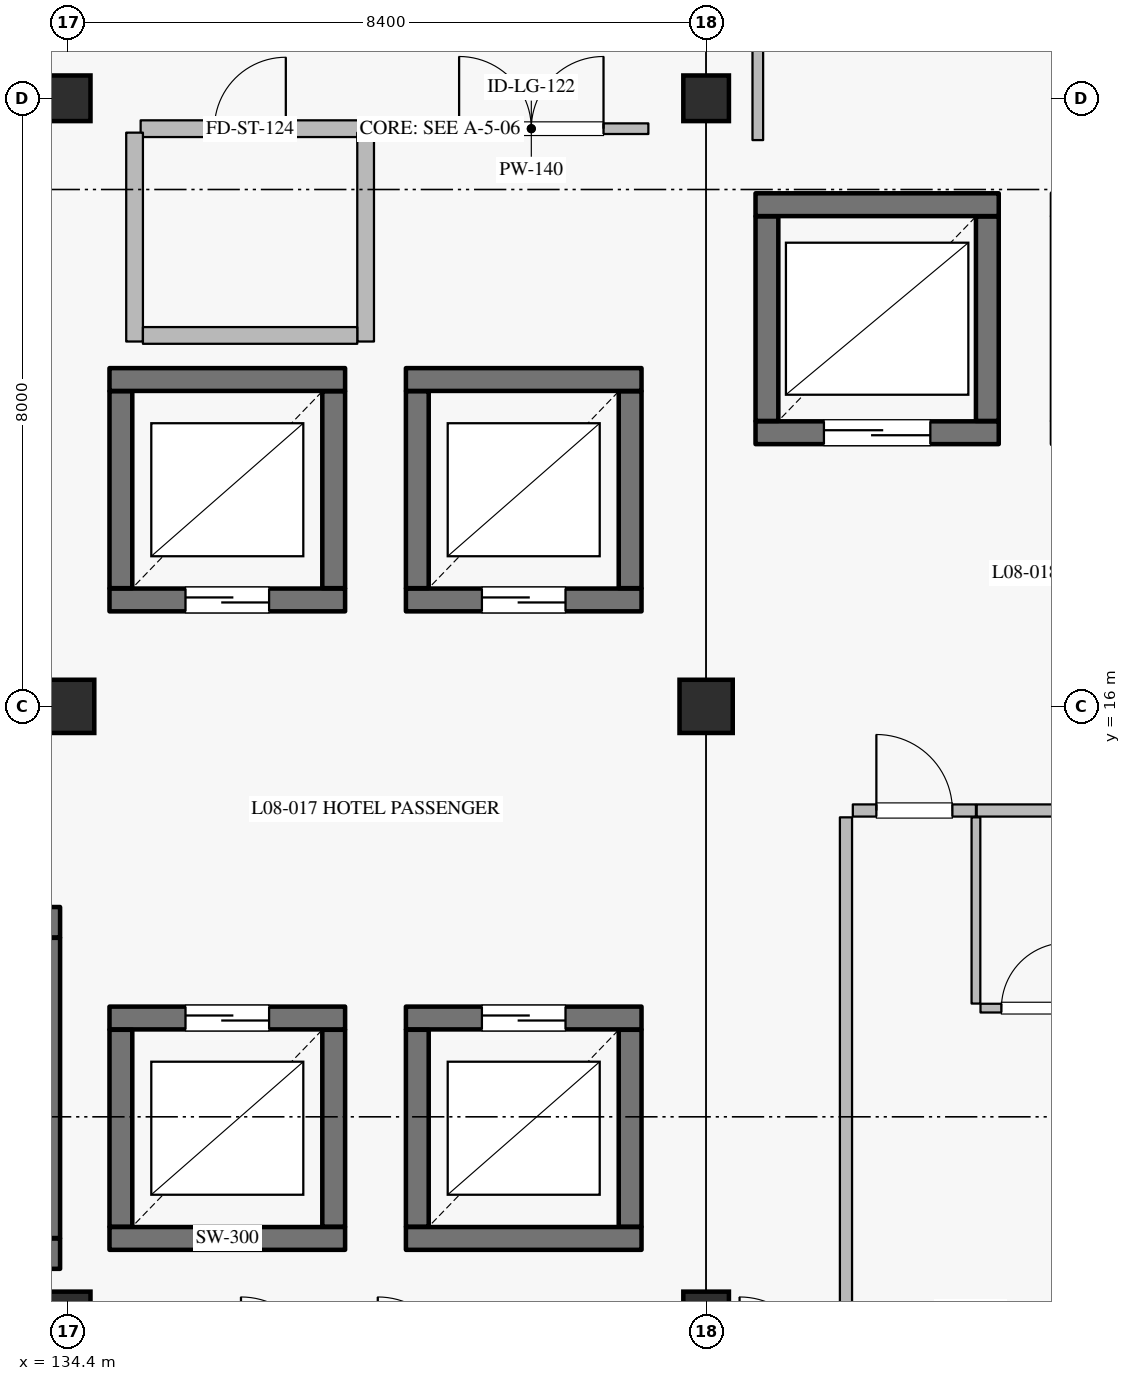
"""IFC4 building model, lengths in metres.
Left out: names, types, materials, properties, quantities, classifications, styles, units other than length and angle.
Written with IfcOpenShell. Run it as: python <this file> out.ifc"""

import sys

from ifc_helpers import new_model, si_unit, direction, frame, frame_2d, origin, origin_2d, place, context, subcontext, project, spatial, rectangle, extrude, element, fill, save


model = new_model("IFC4")
c1 = context("Model", 3, precision=1e-05, world=origin(), true_north=direction((0.0, 1.0)))
c2 = subcontext(c1, "Body", "Model", "MODEL_VIEW")
j1 = project(units=[si_unit("LENGTHUNIT", "METRE"), si_unit("PLANEANGLEUNIT", "RADIAN")], contexts=[c1])
p1 = place(None, origin())
s1 = spatial("IfcSite", under=j1, at=p1, CompositionType="ELEMENT")
p2 = place(p1, origin())
s2 = spatial("IfcBuilding", under=s1, at=p2, CompositionType="ELEMENT")
p3 = place(p2, frame((0.0, 0.0, 36.0)))
s3 = spatial("IfcBuildingStorey", under=s2, at=p3, CompositionType="ELEMENT", Elevation=36.0)
for number, where, z_axis, x_axis in (
    (1, (134.4, 16.0, 0.0), (0.0, 0.0, 1.0), (1.0, 0.0, 0.0)),
    (2, (142.8, 16.0, 0.0), (0.0, 0.0, 1.0), (1.0, 0.0, 0.0)),
):
    element("IfcColumn", number, at=place(p3, frame(where, z_axis=z_axis, x_axis=x_axis)), inside=s3, PredefinedType="COLUMN", context=c2, shape_type="SweptSolid", body=[
        extrude(rectangle(XDim=0.7, YDim=0.7, at=origin_2d()), origin(), (0.0, 0.0, 1.0), 3.6),
    ])
for number, where, z_axis, x_axis in (
    (3, (134.4, 8.0, 0.0), (0.0, 0.0, 1.0), (1.0, 0.0, 0.0)),
    (4, (134.4, 24.0, 0.0), (0.0, 0.0, 1.0), (1.0, 0.0, 0.0)),
    (5, (142.8, 8.0, 0.0), (0.0, 0.0, 1.0), (1.0, 0.0, 0.0)),
    (6, (142.8, 24.0, 0.0), (0.0, 0.0, 1.0), (1.0, 0.0, 0.0)),
):
    element("IfcColumn", number, at=place(p3, frame(where, z_axis=z_axis, x_axis=x_axis)), inside=s3, PredefinedType="COLUMN", context=c2, shape_type="SweptSolid", body=[
        extrude(rectangle(XDim=0.6, YDim=0.6, at=origin_2d()), origin(), (0.0, 0.0, 1.0), 3.6),
    ])
p4 = place(p3, frame((134.95, 17.4, 0.0), z_axis=(0.0, 0.0, 1.0), x_axis=(1.0, 0.0, 0.0)))
e7 = element("IfcWall", 7, at=p4, inside=s3, PredefinedType="SHEAR", context=c2, shape_type="SweptSolid", body=[
    extrude(rectangle(XDim=3.1, YDim=0.3, at=frame_2d((1.55, 0.0))), origin(), (0.0, 0.0, 1.0), 3.365),
])
p5 = place(p4, frame((1.0, 0.0, 0.0)))
e8 = element("IfcOpeningElement", 8, at=p5, cuts=e7, PredefinedType="OPENING", context=c2, shape_type="SweptSolid", body=[
    extrude(rectangle(XDim=1.1, YDim=2.2, at=frame_2d((0.55, 1.1))), frame((0.0, 0.16, 0.0), z_axis=(0.0, -1.0, 0.0), x_axis=(1.0, 0.0, 0.0)), (0.0, 0.0, 1.0), 0.32),
])
p6 = place(p3, frame((137.9, 17.555, 0.0), z_axis=(0.0, 0.0, 1.0), x_axis=(0.0, 1.0, 0.0)))
e9 = element("IfcWall", 9, at=p6, inside=s3, PredefinedType="SHEAR", context=c2, shape_type="SweptSolid", body=[
    extrude(rectangle(XDim=2.59, YDim=0.3, at=frame_2d((1.295, 0.0))), origin(), (0.0, 0.0, 1.0), 3.365),
])
p7 = place(p3, frame((138.05, 20.3, 0.0), z_axis=(0.0, 0.0, 1.0), x_axis=(-1.0, 0.0, 0.0)))
e10 = element("IfcWall", 10, at=p7, inside=s3, PredefinedType="SHEAR", context=c2, shape_type="SweptSolid", body=[
    extrude(rectangle(XDim=3.1, YDim=0.3, at=frame_2d((1.55, 0.0))), origin(), (0.0, 0.0, 1.0), 3.365),
])
p8 = place(p3, frame((135.1, 20.145, 0.0), z_axis=(0.0, 0.0, 1.0), x_axis=(0.0, -1.0, 0.0)))
e11 = element("IfcWall", 11, at=p8, inside=s3, PredefinedType="SHEAR", context=c2, shape_type="SweptSolid", body=[
    extrude(rectangle(XDim=2.59, YDim=0.3, at=frame_2d((1.295, 0.0))), origin(), (0.0, 0.0, 1.0), 3.365),
])
p9 = place(p3, frame((138.85, 17.4, 0.0), z_axis=(0.0, 0.0, 1.0), x_axis=(1.0, 0.0, 0.0)))
e12 = element("IfcWall", 12, at=p9, inside=s3, PredefinedType="SHEAR", context=c2, shape_type="SweptSolid", body=[
    extrude(rectangle(XDim=3.1, YDim=0.3, at=frame_2d((1.55, 0.0))), origin(), (0.0, 0.0, 1.0), 3.365),
])
p10 = place(p9, frame((1.0, 0.0, 0.0)))
e13 = element("IfcOpeningElement", 13, at=p10, cuts=e12, PredefinedType="OPENING", context=c2, shape_type="SweptSolid", body=[
    extrude(rectangle(XDim=1.1, YDim=2.2, at=frame_2d((0.55, 1.1))), frame((0.0, 0.16, 0.0), z_axis=(0.0, -1.0, 0.0), x_axis=(1.0, 0.0, 0.0)), (0.0, 0.0, 1.0), 0.32),
])
p11 = place(p3, frame((141.8, 17.555, 0.0), z_axis=(0.0, 0.0, 1.0), x_axis=(0.0, 1.0, 0.0)))
e14 = element("IfcWall", 14, at=p11, inside=s3, PredefinedType="SHEAR", context=c2, shape_type="SweptSolid", body=[
    extrude(rectangle(XDim=2.59, YDim=0.3, at=frame_2d((1.295, 0.0))), origin(), (0.0, 0.0, 1.0), 3.365),
])
p12 = place(p3, frame((141.95, 20.3, 0.0), z_axis=(0.0, 0.0, 1.0), x_axis=(-1.0, 0.0, 0.0)))
e15 = element("IfcWall", 15, at=p12, inside=s3, PredefinedType="SHEAR", context=c2, shape_type="SweptSolid", body=[
    extrude(rectangle(XDim=3.1, YDim=0.3, at=frame_2d((1.55, 0.0))), origin(), (0.0, 0.0, 1.0), 3.365),
])
p13 = place(p3, frame((139.0, 20.145, 0.0), z_axis=(0.0, 0.0, 1.0), x_axis=(0.0, -1.0, 0.0)))
e16 = element("IfcWall", 16, at=p13, inside=s3, PredefinedType="SHEAR", context=c2, shape_type="SweptSolid", body=[
    extrude(rectangle(XDim=2.59, YDim=0.3, at=frame_2d((1.295, 0.0))), origin(), (0.0, 0.0, 1.0), 3.365),
])
p14 = place(p3, frame((134.95, 9.0, 0.0), z_axis=(0.0, 0.0, 1.0), x_axis=(1.0, 0.0, 0.0)))
e17 = element("IfcWall", 17, at=p14, inside=s3, PredefinedType="SHEAR", context=c2, shape_type="SweptSolid", body=[
    extrude(rectangle(XDim=3.1, YDim=0.3, at=frame_2d((1.55, 0.0))), origin(), (0.0, 0.0, 1.0), 3.365),
])
p15 = place(p3, frame((137.9, 9.155, 0.0), z_axis=(0.0, 0.0, 1.0), x_axis=(0.0, 1.0, 0.0)))
e18 = element("IfcWall", 18, at=p15, inside=s3, PredefinedType="SHEAR", context=c2, shape_type="SweptSolid", body=[
    extrude(rectangle(XDim=2.59, YDim=0.3, at=frame_2d((1.295, 0.0))), origin(), (0.0, 0.0, 1.0), 3.365),
])
p16 = place(p3, frame((138.05, 11.9, 0.0), z_axis=(0.0, 0.0, 1.0), x_axis=(-1.0, 0.0, 0.0)))
e19 = element("IfcWall", 19, at=p16, inside=s3, PredefinedType="SHEAR", context=c2, shape_type="SweptSolid", body=[
    extrude(rectangle(XDim=3.1, YDim=0.3, at=frame_2d((1.55, 0.0))), origin(), (0.0, 0.0, 1.0), 3.365),
])
p17 = place(p16, frame((1.0, 0.0, 0.0)))
e20 = element("IfcOpeningElement", 20, at=p17, cuts=e19, PredefinedType="OPENING", context=c2, shape_type="SweptSolid", body=[
    extrude(rectangle(XDim=1.1, YDim=2.2, at=frame_2d((0.55, 1.1))), frame((0.0, 0.16, 0.0), z_axis=(0.0, -1.0, 0.0), x_axis=(1.0, 0.0, 0.0)), (0.0, 0.0, 1.0), 0.32),
])
p18 = place(p3, frame((135.1, 11.745, 0.0), z_axis=(0.0, 0.0, 1.0), x_axis=(0.0, -1.0, 0.0)))
e21 = element("IfcWall", 21, at=p18, inside=s3, PredefinedType="SHEAR", context=c2, shape_type="SweptSolid", body=[
    extrude(rectangle(XDim=2.59, YDim=0.3, at=frame_2d((1.295, 0.0))), origin(), (0.0, 0.0, 1.0), 3.365),
])
p19 = place(p3, frame((138.85, 9.0, 0.0), z_axis=(0.0, 0.0, 1.0), x_axis=(1.0, 0.0, 0.0)))
e22 = element("IfcWall", 22, at=p19, inside=s3, PredefinedType="SHEAR", context=c2, shape_type="SweptSolid", body=[
    extrude(rectangle(XDim=3.1, YDim=0.3, at=frame_2d((1.55, 0.0))), origin(), (0.0, 0.0, 1.0), 3.365),
])
p20 = place(p3, frame((141.8, 9.155, 0.0), z_axis=(0.0, 0.0, 1.0), x_axis=(0.0, 1.0, 0.0)))
e23 = element("IfcWall", 23, at=p20, inside=s3, PredefinedType="SHEAR", context=c2, shape_type="SweptSolid", body=[
    extrude(rectangle(XDim=2.59, YDim=0.3, at=frame_2d((1.295, 0.0))), origin(), (0.0, 0.0, 1.0), 3.365),
])
p21 = place(p3, frame((141.95, 11.9, 0.0), z_axis=(0.0, 0.0, 1.0), x_axis=(-1.0, 0.0, 0.0)))
e24 = element("IfcWall", 24, at=p21, inside=s3, PredefinedType="SHEAR", context=c2, shape_type="SweptSolid", body=[
    extrude(rectangle(XDim=3.1, YDim=0.3, at=frame_2d((1.55, 0.0))), origin(), (0.0, 0.0, 1.0), 3.365),
])
p22 = place(p21, frame((1.0, 0.0, 0.0)))
e25 = element("IfcOpeningElement", 25, at=p22, cuts=e24, PredefinedType="OPENING", context=c2, shape_type="SweptSolid", body=[
    extrude(rectangle(XDim=1.1, YDim=2.2, at=frame_2d((0.55, 1.1))), frame((0.0, 0.16, 0.0), z_axis=(0.0, -1.0, 0.0), x_axis=(1.0, 0.0, 0.0)), (0.0, 0.0, 1.0), 0.32),
])
p23 = place(p3, frame((139.0, 11.745, 0.0), z_axis=(0.0, 0.0, 1.0), x_axis=(0.0, -1.0, 0.0)))
e26 = element("IfcWall", 26, at=p23, inside=s3, PredefinedType="SHEAR", context=c2, shape_type="SweptSolid", body=[
    extrude(rectangle(XDim=2.59, YDim=0.3, at=frame_2d((1.295, 0.0))), origin(), (0.0, 0.0, 1.0), 3.365),
])
p24 = place(p3, frame((143.45, 19.6, 0.0), z_axis=(0.0, 0.0, 1.0), x_axis=(1.0, 0.0, 0.0)))
e27 = element("IfcWall", 27, at=p24, inside=s3, PredefinedType="SHEAR", context=c2, shape_type="SweptSolid", body=[
    extrude(rectangle(XDim=3.2, YDim=0.3, at=frame_2d((1.6, 0.0))), origin(), (0.0, 0.0, 1.0), 3.365),
])
p25 = place(p24, frame((0.9, 0.0, 0.0)))
e28 = element("IfcOpeningElement", 28, at=p25, cuts=e27, PredefinedType="OPENING", context=c2, shape_type="SweptSolid", body=[
    extrude(rectangle(XDim=1.4, YDim=2.35, at=frame_2d((0.7, 1.175))), frame((0.0, 0.16, 0.0), z_axis=(0.0, -1.0, 0.0), x_axis=(1.0, 0.0, 0.0)), (0.0, 0.0, 1.0), 0.32),
])
p26 = place(p3, frame((146.5, 19.755, 0.0), z_axis=(0.0, 0.0, 1.0), x_axis=(0.0, 1.0, 0.0)))
e29 = element("IfcWall", 29, at=p26, inside=s3, PredefinedType="SHEAR", context=c2, shape_type="SweptSolid", body=[
    extrude(rectangle(XDim=2.69, YDim=0.3, at=frame_2d((1.345, 0.0))), origin(), (0.0, 0.0, 1.0), 3.365),
])
p27 = place(p3, frame((146.65, 22.6, 0.0), z_axis=(0.0, 0.0, 1.0), x_axis=(-1.0, 0.0, 0.0)))
e30 = element("IfcWall", 30, at=p27, inside=s3, PredefinedType="SHEAR", context=c2, shape_type="SweptSolid", body=[
    extrude(rectangle(XDim=3.2, YDim=0.3, at=frame_2d((1.6, 0.0))), origin(), (0.0, 0.0, 1.0), 3.365),
])
p28 = place(p3, frame((143.6, 22.445, 0.0), z_axis=(0.0, 0.0, 1.0), x_axis=(0.0, -1.0, 0.0)))
e31 = element("IfcWall", 31, at=p28, inside=s3, PredefinedType="SHEAR", context=c2, shape_type="SweptSolid", body=[
    extrude(rectangle(XDim=2.69, YDim=0.3, at=frame_2d((1.345, 0.0))), origin(), (0.0, 0.0, 1.0), 3.365),
])
p29 = place(p3, frame((126.1, 8.8, 0.0), z_axis=(0.0, 0.0, 1.0), x_axis=(1.0, 0.0, 0.0)))
e32 = element("IfcWall", 32, at=p29, inside=s3, PredefinedType="SHEAR", context=c2, shape_type="SweptSolid", body=[
    extrude(rectangle(XDim=8.2, YDim=0.4, at=frame_2d((4.1, 0.0))), origin(), (0.0, 0.0, 1.0), 3.365),
])
p30 = place(p3, frame((134.1, 9.005, 0.0), z_axis=(0.0, 0.0, 1.0), x_axis=(0.0, 1.0, 0.0)))
e33 = element("IfcWall", 33, at=p30, inside=s3, PredefinedType="SHEAR", context=c2, shape_type="SweptSolid", body=[
    extrude(rectangle(XDim=3.95, YDim=0.4, at=frame_2d((1.975, 0.0))), origin(), (0.0, 0.0, 1.0), 3.365),
])
p31 = place(p3, frame((126.1, 13.16, 0.0), z_axis=(0.0, 0.0, 1.0), x_axis=(1.0, 0.0, 0.0)))
e34 = element("IfcWall", 34, at=p31, inside=s3, PredefinedType="SHEAR", context=c2, shape_type="SweptSolid", body=[
    extrude(rectangle(XDim=8.2, YDim=0.4, at=frame_2d((4.1, 0.0))), origin(), (0.0, 0.0, 1.0), 3.365),
])
p32 = place(p31, frame((0.43, 0.0, 0.0)))
e35 = element("IfcOpeningElement", 35, at=p32, cuts=e34, PredefinedType="OPENING", context=c2, shape_type="SweptSolid", body=[
    extrude(rectangle(XDim=1.16, YDim=2.2, at=frame_2d((0.58, 1.1))), frame((0.0, 0.21, 0.0), z_axis=(0.0, -1.0, 0.0), x_axis=(1.0, 0.0, 0.0)), (0.0, 0.0, 1.0), 0.42),
])
p33 = place(p3, frame((144.73, 14.63, 0.0), z_axis=(0.0, 0.0, 1.0), x_axis=(1.0, 0.0, 0.0)))
e36 = element("IfcWall", 36, at=p33, inside=s3, PredefinedType="PARTITIONING", context=c2, shape_type="SweptSolid", body=[
    extrude(rectangle(XDim=1.62, YDim=0.16, at=frame_2d((0.81, 0.0))), origin(), (0.0, 0.0, 1.0), 3.365),
])
p34 = place(p33, frame((0.31, 0.0, 0.0)))
e37 = element("IfcOpeningElement", 37, at=p34, cuts=e36, PredefinedType="OPENING", context=c2, shape_type="SweptSolid", body=[
    extrude(rectangle(XDim=1.0, YDim=2.25, at=frame_2d((0.5, 1.125))), frame((0.0, 0.09, 0.0), z_axis=(0.0, -1.0, 0.0), x_axis=(1.0, 0.0, 0.0)), (0.0, 0.0, 1.0), 0.18),
])
p35 = place(p3, frame((146.36, 14.63, 0.0), z_axis=(0.0, 0.0, 1.0), x_axis=(1.0, 0.0, 0.0)))
e38 = element("IfcWall", 38, at=p35, inside=s3, PredefinedType="PARTITIONING", context=c2, shape_type="SweptSolid", body=[
    extrude(rectangle(XDim=1.47, YDim=0.16, at=frame_2d((0.735, 0.0))), origin(), (0.0, 0.0, 1.0), 3.365),
])
p36 = place(p3, frame((146.35, 12.09, 0.0), z_axis=(0.0, 0.0, 1.0), x_axis=(0.0, 1.0, 0.0)))
e39 = element("IfcWall", 39, at=p36, inside=s3, PredefinedType="PARTITIONING", context=c2, shape_type="SweptSolid", body=[
    extrude(rectangle(XDim=2.45, YDim=0.115, at=frame_2d((1.225, 0.0))), origin(), (0.0, 0.0, 1.0), 3.365),
])
p37 = place(p3, frame((146.41, 12.03, 0.0), z_axis=(0.0, 0.0, 1.0), x_axis=(1.0, 0.0, 0.0)))
e40 = element("IfcWall", 40, at=p37, inside=s3, PredefinedType="PARTITIONING", context=c2, shape_type="SweptSolid", body=[
    extrude(rectangle(XDim=1.41, YDim=0.115, at=frame_2d((0.705, 0.0))), origin(), (0.0, 0.0, 1.0), 3.365),
])
p38 = place(p37, frame((0.275, 0.0, 0.0)))
e41 = element("IfcOpeningElement", 41, at=p38, cuts=e40, PredefinedType="OPENING", context=c2, shape_type="SweptSolid", body=[
    extrude(rectangle(XDim=0.86, YDim=2.12, at=frame_2d((0.43, 1.06))), frame((0.0, 0.067, 0.0), z_axis=(0.0, -1.0, 0.0), x_axis=(1.0, 0.0, 0.0)), (0.0, 0.0, 1.0), 0.135),
])
p39 = place(p3, frame((144.64, 5.22, 0.0), z_axis=(0.0, 0.0, 1.0), x_axis=(0.0, 1.0, 0.0)))
e42 = element("IfcWall", 42, at=p39, inside=s3, PredefinedType="PARTITIONING", context=c2, shape_type="SweptSolid", body=[
    extrude(rectangle(XDim=9.32, YDim=0.16, at=frame_2d((4.66, 0.0))), origin(), (0.0, 0.0, 1.0), 3.365),
])
p40 = place(p3, frame((138.96, 23.6, 0.0), z_axis=(0.0, 0.0, 1.0), x_axis=(1.0, 0.0, 0.0)))
e43 = element("IfcWall", 43, at=p40, inside=s3, PredefinedType="PARTITIONING", context=c2, shape_type="SweptSolid", body=[
    extrude(rectangle(XDim=3.08, YDim=0.14, at=frame_2d((1.54, 0.0))), origin(), (0.0, 0.0, 1.0), 3.365),
])
p41 = place(p40, frame((0.59, 0.0, 0.0)))
e44 = element("IfcOpeningElement", 44, at=p41, cuts=e43, PredefinedType="OPENING", context=c2, shape_type="SweptSolid", body=[
    extrude(rectangle(XDim=1.9, YDim=2.4, at=frame_2d((0.95, 1.2))), frame((0.0, 0.08, 0.0), z_axis=(0.0, -1.0, 0.0), x_axis=(1.0, 0.0, 0.0)), (0.0, 0.0, 1.0), 0.16),
])
p42 = place(p3, frame((135.36, 23.6, 0.0), z_axis=(0.0, 0.0, 1.0), x_axis=(1.0, 0.0, 0.0)))
e45 = element("IfcWall", 45, at=p42, inside=s3, PredefinedType="PARTITIONING", context=c2, shape_type="SweptSolid", body=[
    extrude(rectangle(XDim=2.88, YDim=0.22, at=frame_2d((1.44, 0.0))), origin(), (0.0, 0.0, 1.0), 3.365),
])
p43 = place(p42, frame((0.97, 0.0, 0.0)))
e46 = element("IfcOpeningElement", 46, at=p43, cuts=e45, PredefinedType="OPENING", context=c2, shape_type="SweptSolid", body=[
    extrude(rectangle(XDim=0.94, YDim=2.15, at=frame_2d((0.47, 1.075))), frame((0.0, 0.12, 0.0), z_axis=(0.0, -1.0, 0.0), x_axis=(1.0, 0.0, 0.0)), (0.0, 0.0, 1.0), 0.24),
])
p44 = place(p3, frame((143.48, 23.45, 0.0), z_axis=(0.0, 0.0, 1.0), x_axis=(0.0, 1.0, 0.0)))
e47 = element("IfcWall", 47, at=p44, inside=s3, PredefinedType="PARTITIONING", context=c2, shape_type="SweptSolid", body=[
    extrude(rectangle(XDim=3.21, YDim=0.14, at=frame_2d((1.605, 0.0))), origin(), (0.0, 0.0, 1.0), 3.365),
])
for number, where, z_axis, x_axis in (
    (48, (135.28, 20.8, 0.0), (0.0, 0.0, 1.0), (0.0, 1.0, 0.0)),
    (49, (138.32, 20.8, 0.0), (0.0, 0.0, 1.0), (0.0, 1.0, 0.0)),
):
    element("IfcWall", number, at=place(p3, frame(where, z_axis=z_axis, x_axis=x_axis)), inside=s3, PredefinedType="PARTITIONING", context=c2, shape_type="SweptSolid", body=[
        extrude(rectangle(XDim=2.748, YDim=0.22, at=frame_2d((1.374, 0.0))), origin(), (0.0, 0.0, 1.0), 3.365),
    ])
p45 = place(p3, frame((135.39, 20.88, 0.0), z_axis=(0.0, 0.0, 1.0), x_axis=(1.0, 0.0, 0.0)))
e50 = element("IfcWall", 50, at=p45, inside=s3, PredefinedType="PARTITIONING", context=c2, shape_type="SweptSolid", body=[
    extrude(rectangle(XDim=2.82, YDim=0.22, at=frame_2d((1.41, 0.0))), origin(), (0.0, 0.0, 1.0), 3.365),
])
p46 = place(p5, origin())
e51 = element("IfcDoor", 51, at=p46, inside=s3, OperationType="DOUBLE_DOOR_SLIDING", PredefinedType="DOOR", context=c2, shape_type="SweptSolid", body=[
    extrude(rectangle(XDim=1.1, YDim=2.2, at=frame_2d((0.55, 1.1))), frame((0.0, 0.025, 0.0), z_axis=(0.0, -1.0, 0.0), x_axis=(1.0, 0.0, 0.0)), (0.0, 0.0, 1.0), 0.05),
])
fill(e8, e51)
p47 = place(p10, origin())
e52 = element("IfcDoor", 52, at=p47, inside=s3, OperationType="DOUBLE_DOOR_SLIDING", PredefinedType="DOOR", context=c2, shape_type="SweptSolid", body=[
    extrude(rectangle(XDim=1.1, YDim=2.2, at=frame_2d((0.55, 1.1))), frame((0.0, 0.025, 0.0), z_axis=(0.0, -1.0, 0.0), x_axis=(1.0, 0.0, 0.0)), (0.0, 0.0, 1.0), 0.05),
])
fill(e13, e52)
p48 = place(p17, origin())
e53 = element("IfcDoor", 53, at=p48, inside=s3, OperationType="DOUBLE_DOOR_SLIDING", PredefinedType="DOOR", context=c2, shape_type="SweptSolid", body=[
    extrude(rectangle(XDim=1.1, YDim=2.2, at=frame_2d((0.55, 1.1))), frame((0.0, 0.025, 0.0), z_axis=(0.0, -1.0, 0.0), x_axis=(1.0, 0.0, 0.0)), (0.0, 0.0, 1.0), 0.05),
])
fill(e20, e53)
p49 = place(p22, origin())
e54 = element("IfcDoor", 54, at=p49, inside=s3, OperationType="DOUBLE_DOOR_SLIDING", PredefinedType="DOOR", context=c2, shape_type="SweptSolid", body=[
    extrude(rectangle(XDim=1.1, YDim=2.2, at=frame_2d((0.55, 1.1))), frame((0.0, 0.025, 0.0), z_axis=(0.0, -1.0, 0.0), x_axis=(1.0, 0.0, 0.0)), (0.0, 0.0, 1.0), 0.05),
])
fill(e25, e54)
p50 = place(p25, origin())
e55 = element("IfcDoor", 55, at=p50, inside=s3, OperationType="DOUBLE_DOOR_SLIDING", PredefinedType="DOOR", context=c2, shape_type="SweptSolid", body=[
    extrude(rectangle(XDim=1.4, YDim=2.35, at=frame_2d((0.7, 1.175))), frame((0.0, 0.025, 0.0), z_axis=(0.0, -1.0, 0.0), x_axis=(1.0, 0.0, 0.0)), (0.0, 0.0, 1.0), 0.05),
])
fill(e28, e55)
p51 = place(p34, origin())
e56 = element("IfcDoor", 56, at=p51, inside=s3, OperationType="SINGLE_SWING_LEFT", PredefinedType="DOOR", context=c2, shape_type="SweptSolid", body=[
    extrude(rectangle(XDim=1.0, YDim=2.25, at=frame_2d((0.5, 1.125))), frame((0.0, 0.025, 0.0), z_axis=(0.0, -1.0, 0.0), x_axis=(1.0, 0.0, 0.0)), (0.0, 0.0, 1.0), 0.05),
])
fill(e37, e56)
p52 = place(p38, origin())
e57 = element("IfcDoor", 57, at=p52, inside=s3, OperationType="SINGLE_SWING_RIGHT", PredefinedType="DOOR", context=c2, shape_type="SweptSolid", body=[
    extrude(rectangle(XDim=0.86, YDim=2.12, at=frame_2d((0.43, 1.06))), frame((0.0, 0.025, 0.0), z_axis=(0.0, -1.0, 0.0), x_axis=(1.0, 0.0, 0.0)), (0.0, 0.0, 1.0), 0.05),
])
fill(e41, e57)
p53 = place(p41, origin())
e58 = element("IfcDoor", 58, at=p53, inside=s3, OperationType="DOUBLE_DOOR_SINGLE_SWING", PredefinedType="DOOR", context=c2, shape_type="SweptSolid", body=[
    extrude(rectangle(XDim=1.9, YDim=2.4, at=frame_2d((0.95, 1.2))), frame((0.0, 0.025, 0.0), z_axis=(0.0, -1.0, 0.0), x_axis=(1.0, 0.0, 0.0)), (0.0, 0.0, 1.0), 0.05),
])
fill(e44, e58)
p54 = place(p43, origin())
e59 = element("IfcDoor", 59, at=p54, inside=s3, OperationType="SINGLE_SWING_RIGHT", PredefinedType="DOOR", context=c2, shape_type="SweptSolid", body=[
    extrude(rectangle(XDim=0.94, YDim=2.15, at=frame_2d((0.47, 1.075))), frame((0.0, 0.025, 0.0), z_axis=(0.0, -1.0, 0.0), x_axis=(1.0, 0.0, 0.0)), (0.0, 0.0, 1.0), 0.05),
])
fill(e46, e59)
save(model, sys.argv[1])
